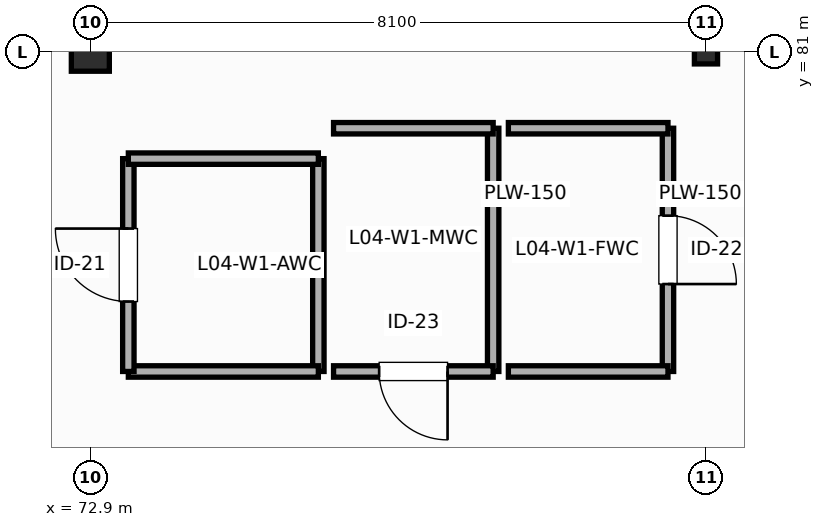
"""IFC4 building model, lengths in metres.
Left out: names, types, materials, properties, quantities, classifications, styles, units other than length and angle.
Written with IfcOpenShell. Run it as: python <this file> out.ifc"""

import sys

from ifc_helpers import new_model, si_unit, direction, frame, frame_2d, origin, origin_2d, place, context, subcontext, project, spatial, rectangle, i_section, extrude, element, fill, save


model = new_model("IFC4")
c1 = context("Model", 3, precision=1e-05, world=origin(), true_north=direction((0.0, 1.0)))
c2 = subcontext(c1, "Body", "Model", "MODEL_VIEW")
j1 = project(units=[si_unit("LENGTHUNIT", "METRE"), si_unit("PLANEANGLEUNIT", "RADIAN")], contexts=[c1])
p1 = place(None, origin())
s1 = spatial("IfcSite", under=j1, at=p1, CompositionType="ELEMENT")
p2 = place(p1, origin())
s2 = spatial("IfcBuilding", under=s1, at=p2, CompositionType="ELEMENT")
p3 = place(p2, frame((0.0, 0.0, 19.2)))
s3 = spatial("IfcBuildingStorey", under=s2, at=p3, CompositionType="ELEMENT", Elevation=19.2)
p4 = place(p3, frame((72.9, 81.0, 0.0), z_axis=(0.0, 0.0, 1.0), x_axis=(1.0, 0.0, 0.0)))
e1 = element("IfcColumn", 1, at=p4, inside=s3, PredefinedType="COLUMN", context=c2, shape_type="SweptSolid", body=[
    extrude(rectangle(XDim=0.5, YDim=0.5, at=origin_2d()), origin(), (0.0, 0.0, 1.0), 4.2),
])
p5 = place(p3, frame((81.0, 81.0, 0.0), z_axis=(0.0, 0.0, 1.0), x_axis=(1.0, 0.0, 0.0)))
e2 = element("IfcColumn", 2, at=p5, inside=s3, PredefinedType="COLUMN", context=c2, shape_type="SweptSolid", body=[
    extrude(i_section(OverallWidth=0.305, OverallDepth=0.308, WebThickness=0.01, FlangeThickness=0.015, FilletRadius=0.015, at=origin_2d()), origin(), (0.0, 0.0, 1.0), 4.2),
])
p6 = place(p3, frame((75.9, 79.6, 0.0), z_axis=(0.0, 0.0, 1.0), x_axis=(0.0, -1.0, 0.0)))
e3 = element("IfcWall", 3, at=p6, inside=s3, PredefinedType="PLUMBINGWALL", context=c2, shape_type="SweptSolid", body=[
    extrude(rectangle(XDim=2.8, YDim=0.15, at=frame_2d((1.4, 0.0))), origin(), (0.0, 0.0, 1.0), 3.92),
])
p7 = place(p3, frame((75.9, 76.8, 0.0), z_axis=(0.0, 0.0, 1.0), x_axis=(-1.0, 0.0, 0.0)))
e4 = element("IfcWall", 4, at=p7, inside=s3, PredefinedType="PLUMBINGWALL", context=c2, shape_type="SweptSolid", body=[
    extrude(rectangle(XDim=2.5, YDim=0.15, at=frame_2d((1.25, 0.0))), origin(), (0.0, 0.0, 1.0), 3.92),
])
p8 = place(p3, frame((73.4, 76.8, 0.0), z_axis=(0.0, 0.0, 1.0), x_axis=(0.0, 1.0, 0.0)))
e5 = element("IfcWall", 5, at=p8, inside=s3, PredefinedType="PLUMBINGWALL", context=c2, shape_type="SweptSolid", body=[
    extrude(rectangle(XDim=2.8, YDim=0.15, at=frame_2d((1.4, 0.0))), origin(), (0.0, 0.0, 1.0), 3.92),
])
p9 = place(p8, frame((0.92, 0.0, 0.0)))
e6 = element("IfcOpeningElement", 6, at=p9, cuts=e5, PredefinedType="OPENING", context=c2, shape_type="SweptSolid", body=[
    extrude(rectangle(XDim=0.96, YDim=2.16, at=frame_2d((0.48, 1.08))), frame((0.0, 0.085, 0.0), z_axis=(0.0, -1.0, 0.0), x_axis=(1.0, 0.0, 0.0)), (0.0, 0.0, 1.0), 0.17),
])
p10 = place(p3, frame((73.4, 79.6, 0.0), z_axis=(0.0, 0.0, 1.0), x_axis=(1.0, 0.0, 0.0)))
e7 = element("IfcWall", 7, at=p10, inside=s3, PredefinedType="PLUMBINGWALL", context=c2, shape_type="SweptSolid", body=[
    extrude(rectangle(XDim=2.5, YDim=0.15, at=frame_2d((1.25, 0.0))), origin(), (0.0, 0.0, 1.0), 3.92),
])
p11 = place(p3, frame((78.2, 80.0, 0.0), z_axis=(0.0, 0.0, 1.0), x_axis=(0.0, -1.0, 0.0)))
e8 = element("IfcWall", 8, at=p11, inside=s3, PredefinedType="PLUMBINGWALL", context=c2, shape_type="SweptSolid", body=[
    extrude(rectangle(XDim=3.2, YDim=0.15, at=frame_2d((1.6, 0.0))), origin(), (0.0, 0.0, 1.0), 3.92),
])
p12 = place(p3, frame((78.2, 76.8, 0.0), z_axis=(0.0, 0.0, 1.0), x_axis=(-1.0, 0.0, 0.0)))
e9 = element("IfcWall", 9, at=p12, inside=s3, PredefinedType="PLUMBINGWALL", context=c2, shape_type="SweptSolid", body=[
    extrude(rectangle(XDim=2.1, YDim=0.15, at=frame_2d((1.05, 0.0))), origin(), (0.0, 0.0, 1.0), 3.92),
])
p13 = place(p12, frame((0.6, 0.0, 0.0)))
e10 = element("IfcOpeningElement", 10, at=p13, cuts=e9, PredefinedType="OPENING", context=c2, shape_type="SweptSolid", body=[
    extrude(rectangle(XDim=0.9, YDim=2.2, at=frame_2d((0.45, 1.1))), frame((0.0, 0.085, 0.0), z_axis=(0.0, -1.0, 0.0), x_axis=(1.0, 0.0, 0.0)), (0.0, 0.0, 1.0), 0.17),
])
p14 = place(p3, frame((76.1, 80.0, 0.0), z_axis=(0.0, 0.0, 1.0), x_axis=(1.0, 0.0, 0.0)))
e11 = element("IfcWall", 11, at=p14, inside=s3, PredefinedType="PLUMBINGWALL", context=c2, shape_type="SweptSolid", body=[
    extrude(rectangle(XDim=2.1, YDim=0.15, at=frame_2d((1.05, 0.0))), origin(), (0.0, 0.0, 1.0), 3.92),
])
p15 = place(p3, frame((80.5, 80.0, 0.0), z_axis=(0.0, 0.0, 1.0), x_axis=(0.0, -1.0, 0.0)))
e12 = element("IfcWall", 12, at=p15, inside=s3, PredefinedType="PLUMBINGWALL", context=c2, shape_type="SweptSolid", body=[
    extrude(rectangle(XDim=3.2, YDim=0.15, at=frame_2d((1.6, 0.0))), origin(), (0.0, 0.0, 1.0), 3.92),
])
p16 = place(p15, frame((1.15, 0.0, 0.0)))
e13 = element("IfcOpeningElement", 13, at=p16, cuts=e12, PredefinedType="OPENING", context=c2, shape_type="SweptSolid", body=[
    extrude(rectangle(XDim=0.9, YDim=2.1, at=frame_2d((0.45, 1.05))), frame((0.0, 0.085, 0.0), z_axis=(0.0, -1.0, 0.0), x_axis=(1.0, 0.0, 0.0)), (0.0, 0.0, 1.0), 0.17),
])
for number, where, z_axis, x_axis in (
    (14, (80.5, 76.8, 0.0), (0.0, 0.0, 1.0), (-1.0, 0.0, 0.0)),
    (15, (78.4, 80.0, 0.0), (0.0, 0.0, 1.0), (1.0, 0.0, 0.0)),
):
    element("IfcWall", number, at=place(p3, frame(where, z_axis=z_axis, x_axis=x_axis)), inside=s3, PredefinedType="PLUMBINGWALL", context=c2, shape_type="SweptSolid", body=[
        extrude(rectangle(XDim=2.1, YDim=0.15, at=frame_2d((1.05, 0.0))), origin(), (0.0, 0.0, 1.0), 3.92),
    ])
p17 = place(p9, origin())
e16 = element("IfcDoor", 16, at=p17, inside=s3, OperationType="SINGLE_SWING_RIGHT", PredefinedType="DOOR", context=c2, shape_type="SweptSolid", body=[
    extrude(rectangle(XDim=0.96, YDim=2.16, at=frame_2d((0.48, 1.08))), frame((0.0, 0.025, 0.0), z_axis=(0.0, -1.0, 0.0), x_axis=(1.0, 0.0, 0.0)), (0.0, 0.0, 1.0), 0.05),
])
fill(e6, e16)
p18 = place(p13, origin())
e17 = element("IfcDoor", 17, at=p18, inside=s3, OperationType="SINGLE_SWING_LEFT", PredefinedType="DOOR", context=c2, shape_type="SweptSolid", body=[
    extrude(rectangle(XDim=0.9, YDim=2.2, at=frame_2d((0.45, 1.1))), frame((0.0, 0.025, 0.0), z_axis=(0.0, -1.0, 0.0), x_axis=(1.0, 0.0, 0.0)), (0.0, 0.0, 1.0), 0.05),
])
fill(e10, e17)
p19 = place(p16, origin())
e18 = element("IfcDoor", 18, at=p19, inside=s3, OperationType="SINGLE_SWING_RIGHT", PredefinedType="DOOR", context=c2, shape_type="SweptSolid", body=[
    extrude(rectangle(XDim=0.9, YDim=2.1, at=frame_2d((0.45, 1.05))), frame((0.0, 0.025, 0.0), z_axis=(0.0, -1.0, 0.0), x_axis=(1.0, 0.0, 0.0)), (0.0, 0.0, 1.0), 0.05),
])
fill(e13, e18)
save(model, sys.argv[1])
